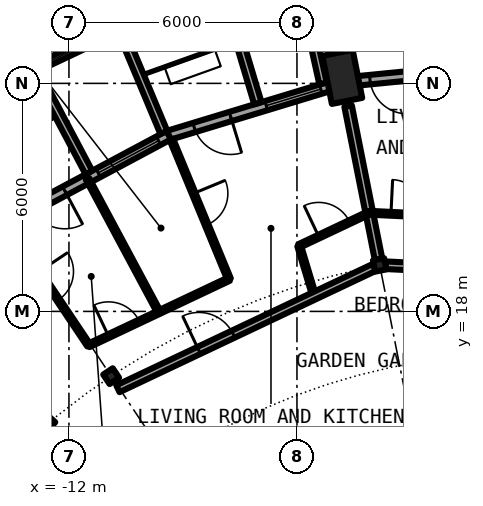
"""IFC4 building model, lengths in metres.
Left out: names, types, materials, properties, quantities, classifications, styles, units other than length and angle.
Written with IfcOpenShell. Run it as: python <this file> out.ifc"""

import sys

from ifc_helpers import new_model, si_unit, direction, frame, frame_2d, origin, origin_2d, place, context, subcontext, project, spatial, rectangle, circle, hollow_circle, i_section, extrude, element, fill, save


model = new_model("IFC4")
c1 = context("Model", 3, precision=1e-05, world=origin(), true_north=direction((0.0, 1.0)))
c2 = subcontext(c1, "Body", "Model", "MODEL_VIEW")
j1 = project(units=[si_unit("LENGTHUNIT", "METRE"), si_unit("PLANEANGLEUNIT", "RADIAN")], contexts=[c1])
p1 = place(None, origin())
s1 = spatial("IfcSite", under=j1, at=p1, CompositionType="ELEMENT")
p2 = place(p1, origin())
s2 = spatial("IfcBuilding", under=s1, at=p2, CompositionType="ELEMENT")
p3 = place(p2, frame((0.0, 0.0, 243.2)))
s3 = spatial("IfcBuildingStorey", under=s2, at=p3, CompositionType="ELEMENT", Elevation=243.2)
p4 = place(p3, frame((-4.934, 24.803, 0.242), z_axis=(0.081385783955, -0.409141348854, 0.908834259273), x_axis=(0.980784129255, 0.195096109141, 0.0)))
e1 = element("IfcColumn", 1, at=p4, inside=s3, PredefinedType="COLUMN", context=c2, shape_type="SweptSolid", body=[
    extrude(hollow_circle(Radius=0.406, WallThickness=0.03, at=origin_2d()), origin(), (0.0, 0.0, 1.0), 3.09),
])
for number, where, z_axis, x_axis in (
    (2, (-3.824, 19.223, 0.0), (0.0, 0.0, 1.0), (-0.195, 0.981, 0.0)),
    (3, (-10.889, 16.297, 0.0), (0.0, 0.0, 1.0), (-0.556, 0.831, 0.0)),
):
    element("IfcColumn", number, at=place(p3, frame(where, z_axis=z_axis, x_axis=x_axis)), inside=s3, PredefinedType="COLUMN", context=c2, shape_type="SweptSolid", body=[
        extrude(i_section(OverallWidth=0.3, OverallDepth=0.3, WebThickness=0.011, FlangeThickness=0.019, FilletRadius=0.027, at=origin_2d()), origin(), (0.0, 0.0, 1.0), 3.05),
    ])
p5 = place(p3, frame((0.0, 24.5, 0.0), z_axis=(0.0, 0.0, 1.0), x_axis=(-0.995181568754, -0.098049197923, 0.0)))
e4 = element("IfcWall", 4, at=p5, inside=s3, PredefinedType="SOLIDWALL", context=c2, shape_type="SweptSolid", body=[
    extrude(rectangle(XDim=4.803, YDim=0.25, at=frame_2d((2.402, 0.0))), origin(), (0.0, 0.0, 1.0), 2.7),
])
p6 = place(p5, frame((0.304, 0.0, 0.3)))
e5 = element("IfcOpeningElement", 5, at=p6, cuts=e4, PredefinedType="OPENING", context=c2, shape_type="SweptSolid", body=[
    extrude(rectangle(XDim=1.8, YDim=2.1, at=frame_2d((0.9, 1.05))), frame((0.0, 0.135, 0.0), z_axis=(0.0, -1.0, 0.0), x_axis=(1.0, 0.0, 0.0)), (0.0, 0.0, 1.0), 0.27),
])
p7 = place(p5, frame((3.099, 0.0, 0.0)))
e6 = element("IfcOpeningElement", 6, at=p7, cuts=e4, PredefinedType="OPENING", context=c2, shape_type="SweptSolid", body=[
    extrude(rectangle(XDim=1.0, YDim=2.2, at=frame_2d((0.5, 1.1))), frame((0.0, 0.135, 0.0), z_axis=(0.0, -1.0, 0.0), x_axis=(1.0, 0.0, 0.0)), (0.0, 0.0, 1.0), 0.27),
])
p8 = place(p3, frame((-4.78, 24.029, 0.0), z_axis=(0.0, 0.0, 1.0), x_axis=(-0.956947414517, -0.290261340605, 0.0)))
e7 = element("IfcWall", 7, at=p8, inside=s3, PredefinedType="SOLIDWALL", context=c2, shape_type="SweptSolid", body=[
    extrude(rectangle(XDim=4.803, YDim=0.25, at=frame_2d((2.401, 0.0))), origin(), (0.0, 0.0, 1.0), 2.7),
])
p9 = place(p8, frame((0.62, 0.0, 0.3)))
e8 = element("IfcOpeningElement", 8, at=p9, cuts=e7, PredefinedType="OPENING", context=c2, shape_type="SweptSolid", body=[
    extrude(rectangle(XDim=1.5, YDim=2.1, at=frame_2d((0.75, 1.05))), frame((0.0, 0.135, 0.0), z_axis=(0.0, -1.0, 0.0), x_axis=(1.0, 0.0, 0.0)), (0.0, 0.0, 1.0), 0.27),
])
p10 = place(p8, frame((3.099, 0.0, 0.0)))
e9 = element("IfcOpeningElement", 9, at=p10, cuts=e7, PredefinedType="OPENING", context=c2, shape_type="SweptSolid", body=[
    extrude(rectangle(XDim=1.0, YDim=2.2, at=frame_2d((0.5, 1.1))), frame((0.0, 0.135, 0.0), z_axis=(0.0, -1.0, 0.0), x_axis=(1.0, 0.0, 0.0)), (0.0, 0.0, 1.0), 0.27),
])
p11 = place(p3, frame((-5.314, 23.998, -0.03), z_axis=(0.0, 0.0, 1.0), x_axis=(-0.216443576636, 0.976295128603, 0.0)))
e10 = element("IfcWall", 10, at=p11, inside=s3, PredefinedType="SOLIDWALL", context=c2, shape_type="SweptSolid", body=[
    extrude(rectangle(XDim=2.92, YDim=0.2, at=frame_2d((1.46, 0.0))), origin(), (0.0, 0.0, 1.0), 2.73),
])
p12 = place(p3, frame((-7.029, 23.477, -0.03), z_axis=(0.0, 0.0, 1.0), x_axis=(-0.286681681931, 0.958025893828, 0.0)))
e11 = element("IfcWall", 11, at=p12, inside=s3, PredefinedType="SOLIDWALL", context=c2, shape_type="SweptSolid", body=[
    extrude(rectangle(XDim=2.992, YDim=0.2, at=frame_2d((1.496, 0.0))), origin(), (0.0, 0.0, 1.0), 2.73),
])
p13 = place(p3, frame((-9.376, 22.635, 0.0), z_axis=(0.0, 0.0, 1.0), x_axis=(-0.881903608701, -0.471429766731, 0.0)))
e12 = element("IfcWall", 12, at=p13, inside=s3, PredefinedType="SOLIDWALL", context=c2, shape_type="SweptSolid", body=[
    extrude(rectangle(XDim=4.802, YDim=0.25, at=frame_2d((2.401, 0.0))), origin(), (0.0, 0.0, 1.0), 2.7),
])
p14 = place(p13, frame((0.304, 0.0, 0.3)))
e13 = element("IfcOpeningElement", 13, at=p14, cuts=e12, PredefinedType="OPENING", context=c2, shape_type="SweptSolid", body=[
    extrude(rectangle(XDim=1.8, YDim=2.1, at=frame_2d((0.9, 1.05))), frame((0.0, 0.135, 0.0), z_axis=(0.0, -1.0, 0.0), x_axis=(1.0, 0.0, 0.0)), (0.0, 0.0, 1.0), 0.27),
])
p15 = place(p13, frame((3.099, 0.0, 0.0)))
e14 = element("IfcOpeningElement", 14, at=p15, cuts=e12, PredefinedType="OPENING", context=c2, shape_type="SweptSolid", body=[
    extrude(rectangle(XDim=1.0, YDim=2.2, at=frame_2d((0.5, 1.1))), frame((0.0, 0.135, 0.0), z_axis=(0.0, -1.0, 0.0), x_axis=(1.0, 0.0, 0.0)), (0.0, 0.0, 1.0), 0.27),
])
p16 = place(p3, frame((-10.558, 25.501, -0.03), z_axis=(0.0, 0.0, 1.0), x_axis=(-0.904004727627, -0.42752245839, 0.0)))
e15 = element("IfcWall", 15, at=p16, inside=s3, PredefinedType="SOLIDWALL", context=c2, shape_type="SweptSolid", body=[
    extrude(rectangle(XDim=2.718, YDim=0.2, at=frame_2d((1.359, 0.0))), origin(), (0.0, 0.0, 1.0), 2.73),
])
p17 = place(p16, frame((0.319, 0.0, 0.33)))
e16 = element("IfcOpeningElement", 16, at=p17, cuts=e15, PredefinedType="OPENING", context=c2, shape_type="SweptSolid", body=[
    extrude(circle(Radius=1.04, at=frame_2d((1.04, 1.04))), frame((0.0, 0.11, 0.0), z_axis=(0.0, -1.0, 0.0), x_axis=(1.0, 0.0, 0.0)), (0.0, 0.0, 1.0), 0.22),
])
p18 = place(p3, frame((-9.503, 22.709, -0.03), z_axis=(0.0, 0.0, 1.0), x_axis=(-0.386136412103, 0.922441689891, 0.0)))
e17 = element("IfcWall", 17, at=p18, inside=s3, PredefinedType="SOLIDWALL", context=c2, shape_type="SweptSolid", body=[
    extrude(rectangle(XDim=2.883, YDim=0.2, at=frame_2d((1.441, 0.0))), origin(), (0.0, 0.0, 1.0), 2.73),
])
p19 = place(p3, frame((-11.475, 21.655, -0.03), z_axis=(0.0, 0.0, 1.0), x_axis=(-0.467917715158, 0.883772036128, 0.0)))
e18 = element("IfcWall", 18, at=p19, inside=s3, PredefinedType="SOLIDWALL", context=c2, shape_type="SweptSolid", body=[
    extrude(rectangle(XDim=2.992, YDim=0.2, at=frame_2d((1.496, 0.0))), origin(), (0.0, 0.0, 1.0), 2.73),
])
p20 = place(p3, frame((-13.294, 19.813, 0.0), z_axis=(0.0, 0.0, 1.0), x_axis=(0.557289656456, -0.830318155171, 0.0)))
e19 = element("IfcWall", 19, at=p20, inside=s3, PredefinedType="PARTITIONING", context=c2, shape_type="SweptSolid", body=[
    extrude(rectangle(XDim=3.26, YDim=0.1, at=frame_2d((1.63, 0.0))), origin(), (0.0, 0.0, 1.0), 2.7),
])
p21 = place(p20, frame((0.922, 0.0, 0.0)))
e20 = element("IfcOpeningElement", 20, at=p21, cuts=e19, PredefinedType="OPENING", context=c2, shape_type="SweptSolid", body=[
    extrude(rectangle(XDim=0.9, YDim=2.3, at=frame_2d((0.45, 1.15))), frame((0.0, 0.06, 0.0), z_axis=(0.0, -1.0, 0.0), x_axis=(1.0, 0.0, 0.0)), (0.0, 0.0, 1.0), 0.12),
])
p22 = place(p3, frame((-11.511, 21.486, 0.0), z_axis=(0.0, 0.0, 1.0), x_axis=(0.472243548981, -0.88146811085, 0.0)))
e21 = element("IfcWall", 21, at=p22, inside=s3, PredefinedType="PARTITIONING", context=c2, shape_type="SweptSolid", body=[
    extrude(rectangle(XDim=3.979, YDim=0.1, at=frame_2d((1.989, 0.0))), origin(), (0.0, 0.0, 1.0), 2.7),
])
p23 = place(p3, frame((-9.306, 22.529, 0.0), z_axis=(0.0, 0.0, 1.0), x_axis=(0.381681535062, -0.924293895789, 0.0)))
e22 = element("IfcWall", 22, at=p23, inside=s3, PredefinedType="PARTITIONING", context=c2, shape_type="SweptSolid", body=[
    extrude(rectangle(XDim=3.979, YDim=0.1, at=frame_2d((1.99, 0.0))), origin(), (0.0, 0.0, 1.0), 2.7),
])
p24 = place(p23, frame((1.54, 0.0, 0.0)))
e23 = element("IfcOpeningElement", 23, at=p24, cuts=e22, PredefinedType="OPENING", context=c2, shape_type="SweptSolid", body=[
    extrude(rectangle(XDim=0.9, YDim=2.3, at=frame_2d((0.45, 1.15))), frame((0.0, 0.06, 0.0), z_axis=(0.0, -1.0, 0.0), x_axis=(1.0, 0.0, 0.0)), (0.0, 0.0, 1.0), 0.12),
])
p25 = place(p3, frame((-5.942, 19.724, 0.0), z_axis=(0.0, 0.0, 1.0), x_axis=(0.288309871528, -0.957537162715, 0.0)))
e24 = element("IfcWall", 24, at=p25, inside=s3, PredefinedType="PARTITIONING", context=c2, shape_type="SweptSolid", body=[
    extrude(rectangle(XDim=1.374, YDim=0.1, at=frame_2d((0.687, 0.0))), origin(), (0.0, 0.0, 1.0), 2.7),
])
p26 = place(p3, frame((-4.654, 23.401, 0.0), z_axis=(0.0, 0.0, 1.0), x_axis=(0.194916411385, -0.98081985735, 0.0)))
e25 = element("IfcWall", 25, at=p26, inside=s3, PredefinedType="PARTITIONING", context=c2, shape_type="SweptSolid", body=[
    extrude(rectangle(XDim=4.11, YDim=0.2, at=frame_2d((2.055, 0.0))), origin(), (0.0, 0.0, 1.0), 2.7),
])
p27 = place(p3, frame((-10.712, 15.965, 0.0), z_axis=(0.0, 0.0, 1.0), x_axis=(0.903916894048, 0.427708134895, 0.0)))
e26 = element("IfcWall", 26, at=p27, inside=s3, PredefinedType="PARTITIONING", context=c2, shape_type="SweptSolid", body=[
    extrude(rectangle(XDim=7.465, YDim=0.2, at=frame_2d((3.732, 0.0))), origin(), (0.0, 0.0, 1.0), 2.45),
])
p28 = place(p27, frame((2.357, 0.0, 0.0)))
e27 = element("IfcOpeningElement", 27, at=p28, cuts=e26, PredefinedType="OPENING", context=c2, shape_type="SweptSolid", body=[
    extrude(rectangle(XDim=1.0, YDim=2.3, at=frame_2d((0.5, 1.15))), frame((0.0, 0.11, 0.0), z_axis=(0.0, -1.0, 0.0), x_axis=(1.0, 0.0, 0.0)), (0.0, 0.0, 1.0), 0.22),
])
p29 = place(p3, frame((-3.669, 19.215, 0.0), z_axis=(0.0, 0.0, 1.0), x_axis=(0.998797907728, -0.049017746978, 0.0)))
e28 = element("IfcWall", 28, at=p29, inside=s3, PredefinedType="PARTITIONING", context=c2, shape_type="SweptSolid", body=[
    extrude(rectangle(XDim=7.466, YDim=0.2, at=frame_2d((3.733, 0.0))), origin(), (0.0, 0.0, 1.0), 2.45),
])
p30 = place(p29, frame((4.107, 0.0, 0.0)))
e29 = element("IfcOpeningElement", 29, at=p30, cuts=e28, PredefinedType="OPENING", context=c2, shape_type="SweptSolid", body=[
    extrude(rectangle(XDim=1.0, YDim=2.3, at=frame_2d((0.5, 1.15))), frame((0.0, 0.11, 0.0), z_axis=(0.0, -1.0, 0.0), x_axis=(1.0, 0.0, 0.0)), (0.0, 0.0, 1.0), 0.22),
])
p31 = place(p3, frame((-16.195, 11.002, 0.0), z_axis=(0.0, 0.0, 1.0), x_axis=(0.671619657805, 0.740896102871, 0.0)))
e30 = element("IfcWall", 30, at=p31, inside=s3, PredefinedType="PARTITIONING", context=c2, shape_type="SweptSolid", body=[
    extrude(rectangle(XDim=5.6, YDim=0.2, at=frame_2d((2.8, 0.0))), origin(), (0.0, 0.0, 1.0), 2.45),
])
p32 = place(p31, frame((3.183, 0.0, 0.0)))
e31 = element("IfcOpeningElement", 31, at=p32, cuts=e30, PredefinedType="OPENING", context=c2, shape_type="SweptSolid", body=[
    extrude(rectangle(XDim=1.0, YDim=2.3, at=frame_2d((0.5, 1.15))), frame((0.0, 0.11, 0.0), z_axis=(0.0, -1.0, 0.0), x_axis=(1.0, 0.0, 0.0)), (0.0, 0.0, 1.0), 0.22),
])
p33 = place(p3, frame((-11.477, 17.106, 0.0), z_axis=(0.0, 0.0, 1.0), x_axis=(0.903998300084, 0.427536049292, 0.0)))
e32 = element("IfcWall", 32, at=p33, inside=s3, PredefinedType="PARTITIONING", context=c2, shape_type="SweptSolid", body=[
    extrude(rectangle(XDim=4.082, YDim=0.1, at=frame_2d((2.041, 0.0))), origin(), (0.0, 0.0, 1.0), 2.7),
])
p34 = place(p33, frame((0.573, 0.0, 0.0)))
e33 = element("IfcOpeningElement", 33, at=p34, cuts=e32, PredefinedType="OPENING", context=c2, shape_type="SweptSolid", body=[
    extrude(rectangle(XDim=0.9, YDim=2.3, at=frame_2d((0.45, 1.15))), frame((0.0, 0.06, 0.0), z_axis=(0.0, -1.0, 0.0), x_axis=(1.0, 0.0, 0.0)), (0.0, 0.0, 1.0), 0.12),
])
p35 = place(p3, frame((-5.946, 19.722, 0.0), z_axis=(0.0, 0.0, 1.0), x_axis=(0.904090755772, 0.427340502794, 0.0)))
e34 = element("IfcWall", 34, at=p35, inside=s3, PredefinedType="PARTITIONING", context=c2, shape_type="SweptSolid", body=[
    extrude(rectangle(XDim=2.041, YDim=0.1, at=frame_2d((1.021, 0.0))), origin(), (0.0, 0.0, 1.0), 2.7),
])
p36 = place(p35, frame((0.575, 0.0, 0.0)))
e35 = element("IfcOpeningElement", 35, at=p36, cuts=e34, PredefinedType="OPENING", context=c2, shape_type="SweptSolid", body=[
    extrude(rectangle(XDim=0.9, YDim=2.3, at=frame_2d((0.45, 1.15))), frame((0.0, 0.06, 0.0), z_axis=(0.0, -1.0, 0.0), x_axis=(1.0, 0.0, 0.0)), (0.0, 0.0, 1.0), 0.12),
])
p37 = place(p3, frame((-4.097, 20.596, 0.0), z_axis=(0.0, 0.0, 1.0), x_axis=(0.998802820655, -0.048917537259, 0.0)))
e36 = element("IfcWall", 36, at=p37, inside=s3, PredefinedType="PARTITIONING", context=c2, shape_type="SweptSolid", body=[
    extrude(rectangle(XDim=2.041, YDim=0.1, at=frame_2d((1.021, 0.0))), origin(), (0.0, 0.0, 1.0), 2.7),
])
p38 = place(p37, frame((0.571, 0.0, 0.0)))
e37 = element("IfcOpeningElement", 37, at=p38, cuts=e36, PredefinedType="OPENING", context=c2, shape_type="SweptSolid", body=[
    extrude(rectangle(XDim=0.9, YDim=2.3, at=frame_2d((0.45, 1.15))), frame((0.0, 0.06, 0.0), z_axis=(0.0, -1.0, 0.0), x_axis=(1.0, 0.0, 0.0)), (0.0, 0.0, 1.0), 0.12),
])
p39 = place(p7, origin())
e38 = element("IfcDoor", 38, at=p39, inside=s3, OperationType="SINGLE_SWING_LEFT", PredefinedType="DOOR", context=c2, shape_type="SweptSolid", body=[
    extrude(rectangle(XDim=1.0, YDim=2.2, at=frame_2d((0.5, 1.1))), frame((0.0, 0.025, 0.0), z_axis=(0.0, -1.0, 0.0), x_axis=(1.0, 0.0, 0.0)), (0.0, 0.0, 1.0), 0.05),
])
fill(e6, e38)
p40 = place(p9, origin())
e39 = element("IfcWindow", 39, at=p40, inside=s3, PartitioningType="SINGLE_PANEL", PredefinedType="WINDOW", context=c2, shape_type="SweptSolid", body=[
    extrude(rectangle(XDim=1.5, YDim=2.1, at=frame_2d((0.75, 1.05))), frame((0.0, 0.03, 0.0), z_axis=(0.0, -1.0, 0.0), x_axis=(1.0, 0.0, 0.0)), (0.0, 0.0, 1.0), 0.06),
])
fill(e8, e39)
p41 = place(p10, origin())
e40 = element("IfcDoor", 40, at=p41, inside=s3, OperationType="SINGLE_SWING_LEFT", PredefinedType="DOOR", context=c2, shape_type="SweptSolid", body=[
    extrude(rectangle(XDim=1.0, YDim=2.2, at=frame_2d((0.5, 1.1))), frame((0.0, 0.025, 0.0), z_axis=(0.0, -1.0, 0.0), x_axis=(1.0, 0.0, 0.0)), (0.0, 0.0, 1.0), 0.05),
])
fill(e9, e40)
p42 = place(p14, origin())
e41 = element("IfcWindow", 41, at=p42, inside=s3, PartitioningType="SINGLE_PANEL", PredefinedType="WINDOW", context=c2, shape_type="SweptSolid", body=[
    extrude(rectangle(XDim=1.8, YDim=2.1, at=frame_2d((0.9, 1.05))), frame((0.0, 0.03, 0.0), z_axis=(0.0, -1.0, 0.0), x_axis=(1.0, 0.0, 0.0)), (0.0, 0.0, 1.0), 0.06),
])
fill(e13, e41)
p43 = place(p17, origin())
e42 = element("IfcWindow", 42, at=p43, inside=s3, PartitioningType="SINGLE_PANEL", PredefinedType="WINDOW", context=c2, shape_type="SweptSolid", body=[
    extrude(circle(Radius=1.04, at=frame_2d((1.04, 1.04))), frame((0.0, 0.03, 0.0), z_axis=(0.0, -1.0, 0.0), x_axis=(1.0, 0.0, 0.0)), (0.0, 0.0, 1.0), 0.06),
])
fill(e16, e42)
p44 = place(p15, origin())
e43 = element("IfcDoor", 43, at=p44, inside=s3, OperationType="SINGLE_SWING_LEFT", PredefinedType="DOOR", context=c2, shape_type="SweptSolid", body=[
    extrude(rectangle(XDim=1.0, YDim=2.2, at=frame_2d((0.5, 1.1))), frame((0.0, 0.025, 0.0), z_axis=(0.0, -1.0, 0.0), x_axis=(1.0, 0.0, 0.0)), (0.0, 0.0, 1.0), 0.05),
])
fill(e14, e43)
p45 = place(p38, origin())
e44 = element("IfcDoor", 44, at=p45, inside=s3, OperationType="SINGLE_SWING_RIGHT", PredefinedType="DOOR", context=c2, shape_type="SweptSolid", body=[
    extrude(rectangle(XDim=0.9, YDim=2.3, at=frame_2d((0.45, 1.15))), frame((0.0, 0.025, 0.0), z_axis=(0.0, -1.0, 0.0), x_axis=(1.0, 0.0, 0.0)), (0.0, 0.0, 1.0), 0.05),
])
fill(e37, e44)
p46 = place(p28, origin())
e45 = element("IfcDoor", 45, at=p46, inside=s3, OperationType="SINGLE_SWING_LEFT", PredefinedType="DOOR", context=c2, shape_type="SweptSolid", body=[
    extrude(rectangle(XDim=1.0, YDim=2.3, at=frame_2d((0.5, 1.15))), frame((0.0, 0.025, 0.0), z_axis=(0.0, -1.0, 0.0), x_axis=(1.0, 0.0, 0.0)), (0.0, 0.0, 1.0), 0.05),
])
fill(e27, e45)
p47 = place(p36, origin())
e46 = element("IfcDoor", 46, at=p47, inside=s3, OperationType="SINGLE_SWING_RIGHT", PredefinedType="DOOR", context=c2, shape_type="SweptSolid", body=[
    extrude(rectangle(XDim=0.9, YDim=2.3, at=frame_2d((0.45, 1.15))), frame((0.0, 0.025, 0.0), z_axis=(0.0, -1.0, 0.0), x_axis=(1.0, 0.0, 0.0)), (0.0, 0.0, 1.0), 0.05),
])
fill(e35, e46)
p48 = place(p24, origin())
e47 = element("IfcDoor", 47, at=p48, inside=s3, OperationType="SINGLE_SWING_LEFT", PredefinedType="DOOR", context=c2, shape_type="SweptSolid", body=[
    extrude(rectangle(XDim=0.9, YDim=2.3, at=frame_2d((0.45, 1.15))), frame((0.0, 0.025, 0.0), z_axis=(0.0, -1.0, 0.0), x_axis=(1.0, 0.0, 0.0)), (0.0, 0.0, 1.0), 0.05),
])
fill(e23, e47)
p49 = place(p34, origin())
e48 = element("IfcDoor", 48, at=p49, inside=s3, OperationType="SINGLE_SWING_LEFT", PredefinedType="DOOR", context=c2, shape_type="SweptSolid", body=[
    extrude(rectangle(XDim=0.9, YDim=2.3, at=frame_2d((0.45, 1.15))), frame((0.0, 0.025, 0.0), z_axis=(0.0, -1.0, 0.0), x_axis=(1.0, 0.0, 0.0)), (0.0, 0.0, 1.0), 0.05),
])
fill(e33, e48)
p50 = place(p21, origin())
e49 = element("IfcDoor", 49, at=p50, inside=s3, OperationType="SINGLE_SWING_LEFT", PredefinedType="DOOR", context=c2, shape_type="SweptSolid", body=[
    extrude(rectangle(XDim=0.9, YDim=2.3, at=frame_2d((0.45, 1.15))), frame((0.0, 0.025, 0.0), z_axis=(0.0, -1.0, 0.0), x_axis=(1.0, 0.0, 0.0)), (0.0, 0.0, 1.0), 0.05),
])
fill(e20, e49)
save(model, sys.argv[1])
